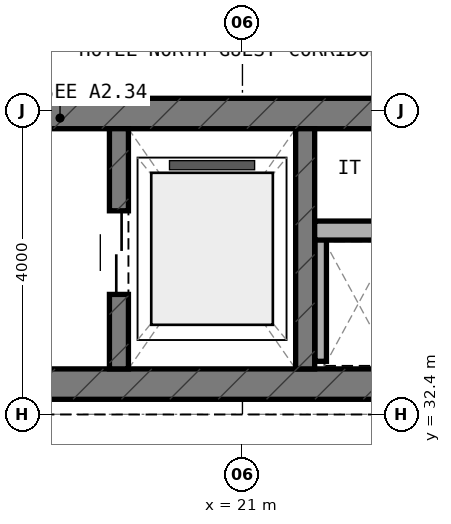
"""IFC4 building model, lengths in metres.
Left out: names, types, materials, properties, quantities, classifications, styles, units other than length and angle.
Written with IfcOpenShell. Run it as: python <this file> out.ifc"""

import sys

from ifc_helpers import new_model, si_unit, direction, frame, frame_2d, origin, place, context, subcontext, project, spatial, rectangle, extrude, element, fill, save


model = new_model("IFC4")
c1 = context("Model", 3, precision=1e-05, world=origin(), true_north=direction((0.0, 1.0)))
c2 = subcontext(c1, "Body", "Model", "MODEL_VIEW")
j1 = project(units=[si_unit("LENGTHUNIT", "METRE"), si_unit("PLANEANGLEUNIT", "RADIAN")], contexts=[c1])
p1 = place(None, origin())
s1 = spatial("IfcSite", under=j1, at=p1, CompositionType="ELEMENT")
p2 = place(p1, origin())
s2 = spatial("IfcBuilding", under=s1, at=p2, CompositionType="ELEMENT")
p3 = place(p2, frame((0.0, 0.0, 152.0)))
s3 = spatial("IfcBuildingStorey", under=s2, at=p3, CompositionType="ELEMENT", Elevation=152.0)
p4 = place(p3, frame((6.4, 32.8, 0.0), z_axis=(0.0, 0.0, 1.0), x_axis=(1.0, 0.0, 0.0)))
e1 = element("IfcWall", 1, at=p4, inside=s3, PredefinedType="SHEAR", context=c2, shape_type="SweptSolid", body=[
    extrude(rectangle(XDim=24.4, YDim=0.4, at=frame_2d((12.2, 0.0))), origin(), (0.0, 0.0, 1.0), 3.5),
])
p5 = place(p4, frame((6.05, 0.0, 0.0)))
e2 = element("IfcOpeningElement", 2, at=p5, cuts=e1, PredefinedType="OPENING", context=c2, shape_type="SweptSolid", body=[
    extrude(rectangle(XDim=1.1, YDim=2.15, at=frame_2d((0.55, 1.075))), frame((0.0, 0.21, 0.0), z_axis=(0.0, -1.0, 0.0), x_axis=(1.0, 0.0, 0.0)), (0.0, 0.0, 1.0), 0.42),
])
p6 = place(p3, frame((6.4, 36.36, 0.0), z_axis=(0.0, 0.0, 1.0), x_axis=(1.0, 0.0, 0.0)))
e3 = element("IfcWall", 3, at=p6, inside=s3, PredefinedType="SHEAR", context=c2, shape_type="SweptSolid", body=[
    extrude(rectangle(XDim=24.4, YDim=0.4, at=frame_2d((12.2, 0.0))), origin(), (0.0, 0.0, 1.0), 3.5),
])
p7 = place(p6, frame((9.15, 0.0, 0.0)))
e4 = element("IfcOpeningElement", 4, at=p7, cuts=e3, PredefinedType="OPENING", context=c2, shape_type="SweptSolid", body=[
    extrude(rectangle(XDim=1.2, YDim=2.15, at=frame_2d((0.6, 1.075))), frame((0.0, 0.21, 0.0), z_axis=(0.0, -1.0, 0.0), x_axis=(1.0, 0.0, 0.0)), (0.0, 0.0, 1.0), 0.42),
])
p8 = place(p6, frame((19.2, 0.0, 0.0)))
e5 = element("IfcOpeningElement", 5, at=p8, cuts=e3, PredefinedType="OPENING", context=c2, shape_type="SweptSolid", body=[
    extrude(rectangle(XDim=0.85, YDim=2.1, at=frame_2d((0.425, 1.05))), frame((0.0, 0.21, 0.0), z_axis=(0.0, -1.0, 0.0), x_axis=(1.0, 0.0, 0.0)), (0.0, 0.0, 1.0), 0.42),
])
p9 = place(p6, frame((16.94, 0.0, 0.0)))
e6 = element("IfcOpeningElement", 6, at=p9, cuts=e3, PredefinedType="OPENING", context=c2, shape_type="SweptSolid", body=[
    extrude(rectangle(XDim=0.85, YDim=2.1, at=frame_2d((0.425, 1.05))), frame((0.0, 0.21, 0.0), z_axis=(0.0, -1.0, 0.0), x_axis=(1.0, 0.0, 0.0)), (0.0, 0.0, 1.0), 0.42),
])
p10 = place(p3, frame((19.375, 33.0, 0.0), z_axis=(0.0, 0.0, 1.0), x_axis=(0.0, 1.0, 0.0)))
e7 = element("IfcWall", 7, at=p10, inside=s3, PredefinedType="STANDARD", context=c2, shape_type="SweptSolid", body=[
    extrude(rectangle(XDim=3.16, YDim=0.25, at=frame_2d((1.58, 0.0))), origin(), (0.0, 0.0, 1.0), 3.22),
])
p11 = place(p10, frame((0.98, 0.0, 0.0)))
e8 = element("IfcOpeningElement", 8, at=p11, cuts=e7, PredefinedType="OPENING", context=c2, shape_type="SweptSolid", body=[
    extrude(rectangle(XDim=1.1, YDim=2.15, at=frame_2d((0.55, 1.075))), frame((0.0, 0.135, 0.0), z_axis=(0.0, -1.0, 0.0), x_axis=(1.0, 0.0, 0.0)), (0.0, 0.0, 1.0), 0.27),
])
p12 = place(p3, frame((21.825, 33.0, 0.0), z_axis=(0.0, 0.0, 1.0), x_axis=(0.0, 1.0, 0.0)))
e9 = element("IfcWall", 9, at=p12, inside=s3, PredefinedType="STANDARD", context=c2, shape_type="SweptSolid", body=[
    extrude(rectangle(XDim=3.16, YDim=0.25, at=frame_2d((1.58, 0.0))), origin(), (0.0, 0.0, 1.0), 3.22),
])
p13 = place(p3, frame((22.03, 33.1, 0.0), z_axis=(0.0, 0.0, 1.0), x_axis=(0.0, 1.0, 0.0)))
e10 = element("IfcWall", 10, at=p13, inside=s3, PredefinedType="PARTITIONING", context=c2, shape_type="SweptSolid", body=[
    extrude(rectangle(XDim=1.62, YDim=0.15, at=frame_2d((0.81, 0.0))), origin(), (0.0, 0.0, 1.0), 3.22),
])
p14 = place(p3, frame((21.95, 34.82, 0.0), z_axis=(0.0, 0.0, 1.0), x_axis=(1.0, 0.0, 0.0)))
e11 = element("IfcWall", 11, at=p14, inside=s3, PredefinedType="SOLIDWALL", context=c2, shape_type="SweptSolid", body=[
    extrude(rectangle(XDim=1.15, YDim=0.25, at=frame_2d((0.575, 0.0))), origin(), (0.0, 0.0, 1.0), 3.22),
])
p15 = place(p11, origin())
e12 = element("IfcDoor", 12, at=p15, inside=s3, OperationType="DOUBLE_DOOR_SLIDING", PredefinedType="DOOR", context=c2, shape_type="SweptSolid", body=[
    extrude(rectangle(XDim=1.1, YDim=2.15, at=frame_2d((0.55, 1.075))), frame((0.0, 0.025, 0.0), z_axis=(0.0, -1.0, 0.0), x_axis=(1.0, 0.0, 0.0)), (0.0, 0.0, 1.0), 0.05),
])
fill(e8, e12)
save(model, sys.argv[1])
